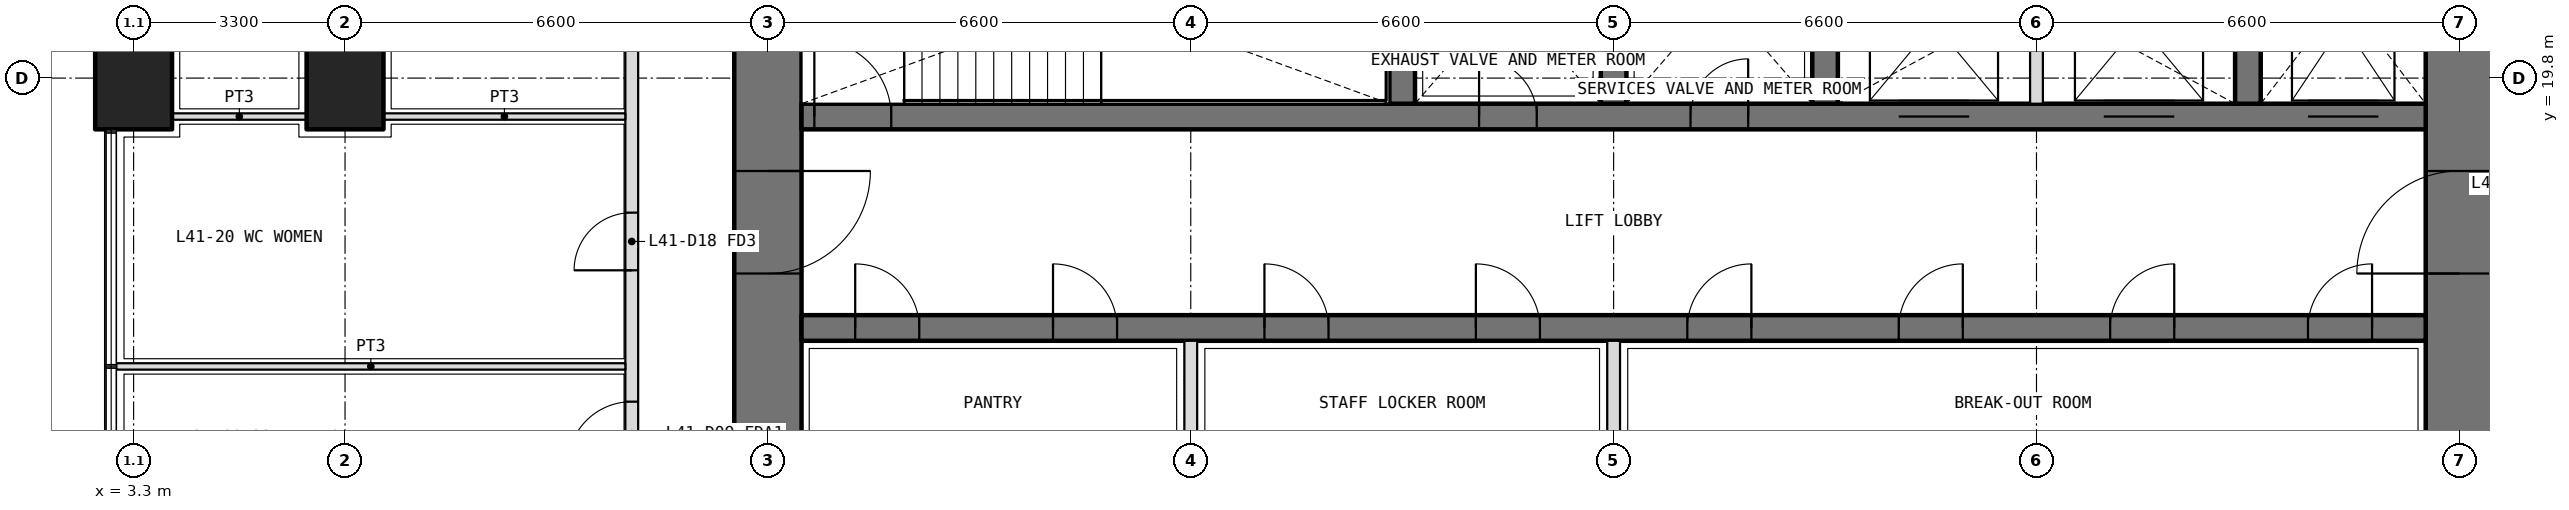
"""IFC4 building model, lengths in metres.
Left out: names, types, materials, properties, quantities, classifications, styles, units other than length and angle.
Written with IfcOpenShell. Run it as: python <this file> out.ifc"""

import sys

from ifc_helpers import new_model, si_unit, direction, frame, frame_2d, origin, origin_2d, place, context, subcontext, project, spatial, rectangle, extrude, element, fill, save


model = new_model("IFC4")
c1 = context("Model", 3, precision=1e-05, world=origin(), true_north=direction((0.0, 1.0)))
c2 = subcontext(c1, "Body", "Model", "MODEL_VIEW")
j1 = project(units=[si_unit("LENGTHUNIT", "METRE"), si_unit("PLANEANGLEUNIT", "RADIAN")], contexts=[c1])
p1 = place(None, origin())
s1 = spatial("IfcSite", under=j1, at=p1, CompositionType="ELEMENT")
p2 = place(p1, origin())
s2 = spatial("IfcBuilding", under=s1, at=p2, CompositionType="ELEMENT")
p3 = place(p2, frame((0.0, 0.0, 180.9)))
s3 = spatial("IfcBuildingStorey", under=s2, at=p3, CompositionType="ELEMENT", Elevation=180.9)
for number, where, z_axis, x_axis in (
    (1, (3.3, 19.8, 0.0), (0.0, 0.0, 1.0), (0.0, 1.0, 0.0)),
    (2, (6.6, 19.8, 0.0), (0.0, 0.0, 1.0), (0.0, 1.0, 0.0)),
):
    element("IfcColumn", number, at=place(p3, frame(where, z_axis=z_axis, x_axis=x_axis)), inside=s3, PredefinedType="COLUMN", context=c2, shape_type="SweptSolid", body=[
        extrude(rectangle(XDim=1.6, YDim=1.2, at=origin_2d()), origin(), (0.0, 0.0, 1.0), 4.2),
    ])
p4 = place(p3, frame((39.6, 13.725, 0.0), z_axis=(0.0, 0.0, 1.0), x_axis=(0.0, 1.0, 0.0)))
e3 = element("IfcWall", 3, at=p4, inside=s3, PredefinedType="SHEAR", context=c2, shape_type="SweptSolid", body=[
    extrude(rectangle(XDim=18.75, YDim=1.05, at=frame_2d((9.375, 0.0))), origin(), (0.0, 0.0, 1.0), 4.2),
])
p5 = place(p4, frame((3.025, 0.0, 0.0)))
e4 = element("IfcOpeningElement", 4, at=p5, cuts=e3, PredefinedType="OPENING", context=c2, shape_type="SweptSolid", body=[
    extrude(rectangle(XDim=1.6, YDim=2.1, at=frame_2d((0.8, 1.05))), frame((0.0, 0.535, 0.0), z_axis=(0.0, -1.0, 0.0), x_axis=(1.0, 0.0, 0.0)), (0.0, 0.0, 1.0), 1.07),
])
p6 = place(p4, frame((13.825, 0.0, 0.0)))
e5 = element("IfcOpeningElement", 5, at=p6, cuts=e3, PredefinedType="OPENING", context=c2, shape_type="SweptSolid", body=[
    extrude(rectangle(XDim=1.6, YDim=2.1, at=frame_2d((0.8, 1.05))), frame((0.0, 0.535, 0.0), z_axis=(0.0, -1.0, 0.0), x_axis=(1.0, 0.0, 0.0)), (0.0, 0.0, 1.0), 1.07),
])
p7 = place(p3, frame((13.2, 32.475, 0.0), z_axis=(0.0, 0.0, 1.0), x_axis=(0.0, -1.0, 0.0)))
e6 = element("IfcWall", 6, at=p7, inside=s3, PredefinedType="SHEAR", context=c2, shape_type="SweptSolid", body=[
    extrude(rectangle(XDim=18.75, YDim=1.05, at=frame_2d((9.375, 0.0))), origin(), (0.0, 0.0, 1.0), 4.2),
])
p8 = place(p7, frame((14.125, 0.0, 0.0)))
e7 = element("IfcOpeningElement", 7, at=p8, cuts=e6, PredefinedType="OPENING", context=c2, shape_type="SweptSolid", body=[
    extrude(rectangle(XDim=1.6, YDim=2.1, at=frame_2d((0.8, 1.05))), frame((0.0, 0.535, 0.0), z_axis=(0.0, -1.0, 0.0), x_axis=(1.0, 0.0, 0.0)), (0.0, 0.0, 1.0), 1.07),
])
p9 = place(p7, frame((3.325, 0.0, 0.0)))
e8 = element("IfcOpeningElement", 8, at=p9, cuts=e6, PredefinedType="OPENING", context=c2, shape_type="SweptSolid", body=[
    extrude(rectangle(XDim=1.6, YDim=2.1, at=frame_2d((0.8, 1.05))), frame((0.0, 0.535, 0.0), z_axis=(0.0, -1.0, 0.0), x_axis=(1.0, 0.0, 0.0)), (0.0, 0.0, 1.0), 1.07),
])
p10 = place(p3, frame((13.725, 15.9, 0.0), z_axis=(0.0, 0.0, 1.0), x_axis=(1.0, 0.0, 0.0)))
e9 = element("IfcWall", 9, at=p10, inside=s3, PredefinedType="SHEAR", context=c2, shape_type="SweptSolid", body=[
    extrude(rectangle(XDim=25.35, YDim=0.4, at=frame_2d((12.675, 0.0))), origin(), (0.0, 0.0, 1.0), 4.2),
])
p11 = place(p10, frame((0.837, 0.0, 0.0)))
e10 = element("IfcOpeningElement", 10, at=p11, cuts=e9, PredefinedType="OPENING", context=c2, shape_type="SweptSolid", body=[
    extrude(rectangle(XDim=1.0, YDim=2.1, at=frame_2d((0.5, 1.05))), frame((0.0, 0.21, 0.0), z_axis=(0.0, -1.0, 0.0), x_axis=(1.0, 0.0, 0.0)), (0.0, 0.0, 1.0), 0.42),
])
p12 = place(p10, frame((3.925, 0.0, 0.0)))
e11 = element("IfcOpeningElement", 11, at=p12, cuts=e9, PredefinedType="OPENING", context=c2, shape_type="SweptSolid", body=[
    extrude(rectangle(XDim=1.0, YDim=2.1, at=frame_2d((0.5, 1.05))), frame((0.0, 0.21, 0.0), z_axis=(0.0, -1.0, 0.0), x_axis=(1.0, 0.0, 0.0)), (0.0, 0.0, 1.0), 0.42),
])
p13 = place(p10, frame((7.225, 0.0, 0.0)))
e12 = element("IfcOpeningElement", 12, at=p13, cuts=e9, PredefinedType="OPENING", context=c2, shape_type="SweptSolid", body=[
    extrude(rectangle(XDim=1.0, YDim=2.1, at=frame_2d((0.5, 1.05))), frame((0.0, 0.21, 0.0), z_axis=(0.0, -1.0, 0.0), x_axis=(1.0, 0.0, 0.0)), (0.0, 0.0, 1.0), 0.42),
])
p14 = place(p10, frame((10.525, 0.0, 0.0)))
e13 = element("IfcOpeningElement", 13, at=p14, cuts=e9, PredefinedType="OPENING", context=c2, shape_type="SweptSolid", body=[
    extrude(rectangle(XDim=1.0, YDim=2.1, at=frame_2d((0.5, 1.05))), frame((0.0, 0.21, 0.0), z_axis=(0.0, -1.0, 0.0), x_axis=(1.0, 0.0, 0.0)), (0.0, 0.0, 1.0), 0.42),
])
p15 = place(p10, frame((13.825, 0.0, 0.0)))
e14 = element("IfcOpeningElement", 14, at=p15, cuts=e9, PredefinedType="OPENING", context=c2, shape_type="SweptSolid", body=[
    extrude(rectangle(XDim=1.0, YDim=2.1, at=frame_2d((0.5, 1.05))), frame((0.0, 0.21, 0.0), z_axis=(0.0, -1.0, 0.0), x_axis=(1.0, 0.0, 0.0)), (0.0, 0.0, 1.0), 0.42),
])
p16 = place(p10, frame((17.125, 0.0, 0.0)))
e15 = element("IfcOpeningElement", 15, at=p16, cuts=e9, PredefinedType="OPENING", context=c2, shape_type="SweptSolid", body=[
    extrude(rectangle(XDim=1.0, YDim=2.1, at=frame_2d((0.5, 1.05))), frame((0.0, 0.21, 0.0), z_axis=(0.0, -1.0, 0.0), x_axis=(1.0, 0.0, 0.0)), (0.0, 0.0, 1.0), 0.42),
])
p17 = place(p10, frame((20.425, 0.0, 0.0)))
e16 = element("IfcOpeningElement", 16, at=p17, cuts=e9, PredefinedType="OPENING", context=c2, shape_type="SweptSolid", body=[
    extrude(rectangle(XDim=1.0, YDim=2.1, at=frame_2d((0.5, 1.05))), frame((0.0, 0.21, 0.0), z_axis=(0.0, -1.0, 0.0), x_axis=(1.0, 0.0, 0.0)), (0.0, 0.0, 1.0), 0.42),
])
p18 = place(p10, frame((23.512, 0.0, 0.0)))
e17 = element("IfcOpeningElement", 17, at=p18, cuts=e9, PredefinedType="OPENING", context=c2, shape_type="SweptSolid", body=[
    extrude(rectangle(XDim=1.0, YDim=2.1, at=frame_2d((0.5, 1.05))), frame((0.0, 0.21, 0.0), z_axis=(0.0, -1.0, 0.0), x_axis=(1.0, 0.0, 0.0)), (0.0, 0.0, 1.0), 0.42),
])
p19 = place(p3, frame((13.725, 19.2, 0.0), z_axis=(0.0, 0.0, 1.0), x_axis=(1.0, 0.0, 0.0)))
e18 = element("IfcWall", 18, at=p19, inside=s3, PredefinedType="SHEAR", context=c2, shape_type="SweptSolid", body=[
    extrude(rectangle(XDim=25.35, YDim=0.4, at=frame_2d((12.675, 0.0))), origin(), (0.0, 0.0, 1.0), 4.2),
])
p20 = place(p19, frame((10.575, 0.0, 0.0)))
e19 = element("IfcOpeningElement", 19, at=p20, cuts=e18, PredefinedType="OPENING", context=c2, shape_type="SweptSolid", body=[
    extrude(rectangle(XDim=0.9, YDim=2.1, at=frame_2d((0.45, 1.05))), frame((0.0, 0.21, 0.0), z_axis=(0.0, -1.0, 0.0), x_axis=(1.0, 0.0, 0.0)), (0.0, 0.0, 1.0), 0.42),
])
p21 = place(p19, frame((13.875, 0.0, 0.0)))
e20 = element("IfcOpeningElement", 20, at=p21, cuts=e18, PredefinedType="OPENING", context=c2, shape_type="SweptSolid", body=[
    extrude(rectangle(XDim=0.9, YDim=2.1, at=frame_2d((0.45, 1.05))), frame((0.0, 0.21, 0.0), z_axis=(0.0, -1.0, 0.0), x_axis=(1.0, 0.0, 0.0)), (0.0, 0.0, 1.0), 0.42),
])
p22 = place(p19, frame((0.2, 0.0, 0.0)))
e21 = element("IfcOpeningElement", 21, at=p22, cuts=e18, PredefinedType="OPENING", context=c2, shape_type="SweptSolid", body=[
    extrude(rectangle(XDim=1.2, YDim=2.1, at=frame_2d((0.6, 1.05))), frame((0.0, 0.21, 0.0), z_axis=(0.0, -1.0, 0.0), x_axis=(1.0, 0.0, 0.0)), (0.0, 0.0, 1.0), 0.42),
])
p23 = place(p19, frame((23.512, 0.0, 0.0)))
e22 = element("IfcOpeningElement", 22, at=p23, cuts=e18, PredefinedType="OPENING", context=c2, shape_type="SweptSolid", body=[
    extrude(rectangle(XDim=1.1, YDim=2.1, at=frame_2d((0.55, 1.05))), frame((0.0, 0.21, 0.0), z_axis=(0.0, -1.0, 0.0), x_axis=(1.0, 0.0, 0.0)), (0.0, 0.0, 1.0), 0.42),
])
p24 = place(p19, frame((17.125, 0.0, 0.0)))
e23 = element("IfcOpeningElement", 23, at=p24, cuts=e18, PredefinedType="OPENING", context=c2, shape_type="SweptSolid", body=[
    extrude(rectangle(XDim=1.1, YDim=2.1, at=frame_2d((0.55, 1.05))), frame((0.0, 0.21, 0.0), z_axis=(0.0, -1.0, 0.0), x_axis=(1.0, 0.0, 0.0)), (0.0, 0.0, 1.0), 0.42),
])
p25 = place(p19, frame((20.325, 0.0, 0.0)))
e24 = element("IfcOpeningElement", 24, at=p25, cuts=e18, PredefinedType="OPENING", context=c2, shape_type="SweptSolid", body=[
    extrude(rectangle(XDim=1.1, YDim=2.1, at=frame_2d((0.55, 1.05))), frame((0.0, 0.21, 0.0), z_axis=(0.0, -1.0, 0.0), x_axis=(1.0, 0.0, 0.0)), (0.0, 0.0, 1.0), 0.42),
])
for number, where, z_axis, x_axis in (
    (25, (23.1, 19.4, 0.0), (0.0, 0.0, 1.0), (0.0, 1.0, 0.0)),
    (26, (26.4, 19.4, 0.0), (0.0, 0.0, 1.0), (0.0, 1.0, 0.0)),
    (27, (29.7, 19.4, 0.0), (0.0, 0.0, 1.0), (0.0, 1.0, 0.0)),
    (28, (36.3, 19.4, 0.0), (0.0, 0.0, 1.0), (0.0, 1.0, 0.0)),
):
    element("IfcWall", number, at=place(p3, frame(where, z_axis=z_axis, x_axis=x_axis)), inside=s3, PredefinedType="SHEAR", context=c2, shape_type="SweptSolid", body=[
        extrude(rectangle(XDim=3.35, YDim=0.4, at=frame_2d((1.675, 0.0))), origin(), (0.0, 0.0, 1.0), 4.2),
    ])
for number, where, z_axis, x_axis in (
    (29, (19.8, 13.725, 0.0), (0.0, 0.0, 1.0), (0.0, 1.0, 0.0)),
    (30, (26.4, 13.725, 0.0), (0.0, 0.0, 1.0), (0.0, 1.0, 0.0)),
):
    element("IfcWall", number, at=place(p3, frame(where, z_axis=z_axis, x_axis=x_axis)), inside=s3, PredefinedType="PARTITIONING", context=c2, shape_type="SweptSolid", body=[
        extrude(rectangle(XDim=1.975, YDim=0.2, at=frame_2d((0.987, 0.0))), origin(), (0.0, 0.0, 1.0), 4.2),
    ])
p26 = place(p3, frame((33.0, 19.4, 0.0), z_axis=(0.0, 0.0, 1.0), x_axis=(0.0, 1.0, 0.0)))
e31 = element("IfcWall", 31, at=p26, inside=s3, PredefinedType="PARTITIONING", context=c2, shape_type="SweptSolid", body=[
    extrude(rectangle(XDim=3.35, YDim=0.2, at=frame_2d((1.675, 0.0))), origin(), (0.0, 0.0, 1.0), 4.2),
])
p27 = place(p3, frame((11.075, 11.175, 0.0), z_axis=(0.0, 0.0, 1.0), x_axis=(0.0, 1.0, 0.0)))
e32 = element("IfcWall", 32, at=p27, inside=s3, PredefinedType="PARTITIONING", context=c2, shape_type="SweptSolid", body=[
    extrude(rectangle(XDim=23.85, YDim=0.2, at=frame_2d((11.925, 0.0))), origin(), (0.0, 0.0, 1.0), 2.85),
])
p28 = place(p27, frame((0.462, 0.0, 0.0)))
e33 = element("IfcOpeningElement", 33, at=p28, cuts=e32, PredefinedType="OPENING", context=c2, shape_type="SweptSolid", body=[
    extrude(rectangle(XDim=1.0, YDim=2.1, at=frame_2d((0.5, 1.05))), frame((0.0, 0.11, 0.0), z_axis=(0.0, -1.0, 0.0), x_axis=(1.0, 0.0, 0.0)), (0.0, 0.0, 1.0), 0.22),
])
p29 = place(p27, frame((2.575, 0.0, 0.0)))
e34 = element("IfcOpeningElement", 34, at=p29, cuts=e32, PredefinedType="OPENING", context=c2, shape_type="SweptSolid", body=[
    extrude(rectangle(XDim=1.0, YDim=2.1, at=frame_2d((0.5, 1.05))), frame((0.0, 0.11, 0.0), z_axis=(0.0, -1.0, 0.0), x_axis=(1.0, 0.0, 0.0)), (0.0, 0.0, 1.0), 0.22),
])
p30 = place(p27, frame((5.625, 0.0, 0.0)))
e35 = element("IfcOpeningElement", 35, at=p30, cuts=e32, PredefinedType="OPENING", context=c2, shape_type="SweptSolid", body=[
    extrude(rectangle(XDim=0.9, YDim=2.1, at=frame_2d((0.45, 1.05))), frame((0.0, 0.11, 0.0), z_axis=(0.0, -1.0, 0.0), x_axis=(1.0, 0.0, 0.0)), (0.0, 0.0, 1.0), 0.22),
])
p31 = place(p27, frame((9.425, 0.0, 0.0)))
e36 = element("IfcOpeningElement", 36, at=p31, cuts=e32, PredefinedType="OPENING", context=c2, shape_type="SweptSolid", body=[
    extrude(rectangle(XDim=0.9, YDim=2.1, at=frame_2d((0.45, 1.05))), frame((0.0, 0.11, 0.0), z_axis=(0.0, -1.0, 0.0), x_axis=(1.0, 0.0, 0.0)), (0.0, 0.0, 1.0), 0.22),
])
p32 = place(p27, frame((12.975, 0.0, 0.0)))
e37 = element("IfcOpeningElement", 37, at=p32, cuts=e32, PredefinedType="OPENING", context=c2, shape_type="SweptSolid", body=[
    extrude(rectangle(XDim=1.0, YDim=2.1, at=frame_2d((0.5, 1.05))), frame((0.0, 0.11, 0.0), z_axis=(0.0, -1.0, 0.0), x_axis=(1.0, 0.0, 0.0)), (0.0, 0.0, 1.0), 0.22),
])
p33 = place(p27, frame((19.087, 0.0, 0.0)))
e38 = element("IfcOpeningElement", 38, at=p33, cuts=e32, PredefinedType="OPENING", context=c2, shape_type="SweptSolid", body=[
    extrude(rectangle(XDim=1.0, YDim=2.1, at=frame_2d((0.5, 1.05))), frame((0.0, 0.11, 0.0), z_axis=(0.0, -1.0, 0.0), x_axis=(1.0, 0.0, 0.0)), (0.0, 0.0, 1.0), 0.22),
])
p34 = place(p3, frame((3.03, 15.3, 0.0), z_axis=(0.0, 0.0, 1.0), x_axis=(1.0, 0.0, 0.0)))
e39 = element("IfcWall", 39, at=p34, inside=s3, PredefinedType="PARTITIONING", context=c2, shape_type="SweptSolid", body=[
    extrude(rectangle(XDim=7.945, YDim=0.1, at=frame_2d((3.973, 0.0))), origin(), (0.0, 0.0, 1.0), 2.7),
])
p35 = place(p3, frame((3.9, 19.2, 0.0), z_axis=(0.0, 0.0, 1.0), x_axis=(1.0, 0.0, 0.0)))
e40 = element("IfcWall", 40, at=p35, inside=s3, PredefinedType="PARTITIONING", context=c2, shape_type="SweptSolid", body=[
    extrude(rectangle(XDim=2.1, YDim=0.1, at=frame_2d((1.05, 0.0))), origin(), (0.0, 0.0, 1.0), 2.85),
])
p36 = place(p3, frame((7.2, 19.2, 0.0), z_axis=(0.0, 0.0, 1.0), x_axis=(1.0, 0.0, 0.0)))
e41 = element("IfcWall", 41, at=p36, inside=s3, PredefinedType="PARTITIONING", context=c2, shape_type="SweptSolid", body=[
    extrude(rectangle(XDim=3.775, YDim=0.1, at=frame_2d((1.888, 0.0))), origin(), (0.0, 0.0, 1.0), 2.85),
])
p37 = place(p29, origin())
e42 = element("IfcDoor", 42, at=p37, inside=s3, OperationType="SINGLE_SWING_LEFT", PredefinedType="DOOR", context=c2, shape_type="SweptSolid", body=[
    extrude(rectangle(XDim=1.0, YDim=2.1, at=frame_2d((0.5, 1.05))), frame((0.0, 0.025, 0.0), z_axis=(0.0, -1.0, 0.0), x_axis=(1.0, 0.0, 0.0)), (0.0, 0.0, 1.0), 0.05),
])
fill(e34, e42)
p38 = place(p30, origin())
e43 = element("IfcDoor", 43, at=p38, inside=s3, OperationType="SINGLE_SWING_LEFT", PredefinedType="DOOR", context=c2, shape_type="SweptSolid", body=[
    extrude(rectangle(XDim=0.9, YDim=2.1, at=frame_2d((0.45, 1.05))), frame((0.0, 0.025, 0.0), z_axis=(0.0, -1.0, 0.0), x_axis=(1.0, 0.0, 0.0)), (0.0, 0.0, 1.0), 0.05),
])
fill(e35, e43)
p39 = place(p20, origin())
e44 = element("IfcDoor", 44, at=p39, inside=s3, OperationType="SINGLE_SWING_LEFT", PredefinedType="DOOR", context=c2, shape_type="SweptSolid", body=[
    extrude(rectangle(XDim=0.9, YDim=2.1, at=frame_2d((0.45, 1.05))), frame((0.0, 0.025, 0.0), z_axis=(0.0, -1.0, 0.0), x_axis=(1.0, 0.0, 0.0)), (0.0, 0.0, 1.0), 0.05),
])
fill(e19, e44)
p40 = place(p21, origin())
e45 = element("IfcDoor", 45, at=p40, inside=s3, OperationType="SINGLE_SWING_RIGHT", PredefinedType="DOOR", context=c2, shape_type="SweptSolid", body=[
    extrude(rectangle(XDim=0.9, YDim=2.1, at=frame_2d((0.45, 1.05))), frame((0.0, 0.025, 0.0), z_axis=(0.0, -1.0, 0.0), x_axis=(1.0, 0.0, 0.0)), (0.0, 0.0, 1.0), 0.05),
])
fill(e20, e45)
p41 = place(p11, origin())
e46 = element("IfcDoor", 46, at=p41, inside=s3, OperationType="SINGLE_SWING_LEFT", PredefinedType="DOOR", context=c2, shape_type="SweptSolid", body=[
    extrude(rectangle(XDim=1.0, YDim=2.1, at=frame_2d((0.5, 1.05))), frame((0.0, 0.025, 0.0), z_axis=(0.0, -1.0, 0.0), x_axis=(1.0, 0.0, 0.0)), (0.0, 0.0, 1.0), 0.05),
])
fill(e10, e46)
p42 = place(p12, origin())
e47 = element("IfcDoor", 47, at=p42, inside=s3, OperationType="SINGLE_SWING_LEFT", PredefinedType="DOOR", context=c2, shape_type="SweptSolid", body=[
    extrude(rectangle(XDim=1.0, YDim=2.1, at=frame_2d((0.5, 1.05))), frame((0.0, 0.025, 0.0), z_axis=(0.0, -1.0, 0.0), x_axis=(1.0, 0.0, 0.0)), (0.0, 0.0, 1.0), 0.05),
])
fill(e11, e47)
p43 = place(p13, origin())
e48 = element("IfcDoor", 48, at=p43, inside=s3, OperationType="SINGLE_SWING_LEFT", PredefinedType="DOOR", context=c2, shape_type="SweptSolid", body=[
    extrude(rectangle(XDim=1.0, YDim=2.1, at=frame_2d((0.5, 1.05))), frame((0.0, 0.025, 0.0), z_axis=(0.0, -1.0, 0.0), x_axis=(1.0, 0.0, 0.0)), (0.0, 0.0, 1.0), 0.05),
])
fill(e12, e48)
p44 = place(p14, origin())
e49 = element("IfcDoor", 49, at=p44, inside=s3, OperationType="SINGLE_SWING_LEFT", PredefinedType="DOOR", context=c2, shape_type="SweptSolid", body=[
    extrude(rectangle(XDim=1.0, YDim=2.1, at=frame_2d((0.5, 1.05))), frame((0.0, 0.025, 0.0), z_axis=(0.0, -1.0, 0.0), x_axis=(1.0, 0.0, 0.0)), (0.0, 0.0, 1.0), 0.05),
])
fill(e13, e49)
p45 = place(p15, origin())
e50 = element("IfcDoor", 50, at=p45, inside=s3, OperationType="SINGLE_SWING_RIGHT", PredefinedType="DOOR", context=c2, shape_type="SweptSolid", body=[
    extrude(rectangle(XDim=1.0, YDim=2.1, at=frame_2d((0.5, 1.05))), frame((0.0, 0.025, 0.0), z_axis=(0.0, -1.0, 0.0), x_axis=(1.0, 0.0, 0.0)), (0.0, 0.0, 1.0), 0.05),
])
fill(e14, e50)
p46 = place(p16, origin())
e51 = element("IfcDoor", 51, at=p46, inside=s3, OperationType="SINGLE_SWING_RIGHT", PredefinedType="DOOR", context=c2, shape_type="SweptSolid", body=[
    extrude(rectangle(XDim=1.0, YDim=2.1, at=frame_2d((0.5, 1.05))), frame((0.0, 0.025, 0.0), z_axis=(0.0, -1.0, 0.0), x_axis=(1.0, 0.0, 0.0)), (0.0, 0.0, 1.0), 0.05),
])
fill(e15, e51)
p47 = place(p17, origin())
e52 = element("IfcDoor", 52, at=p47, inside=s3, OperationType="SINGLE_SWING_RIGHT", PredefinedType="DOOR", context=c2, shape_type="SweptSolid", body=[
    extrude(rectangle(XDim=1.0, YDim=2.1, at=frame_2d((0.5, 1.05))), frame((0.0, 0.025, 0.0), z_axis=(0.0, -1.0, 0.0), x_axis=(1.0, 0.0, 0.0)), (0.0, 0.0, 1.0), 0.05),
])
fill(e16, e52)
p48 = place(p18, origin())
e53 = element("IfcDoor", 53, at=p48, inside=s3, OperationType="SINGLE_SWING_RIGHT", PredefinedType="DOOR", context=c2, shape_type="SweptSolid", body=[
    extrude(rectangle(XDim=1.0, YDim=2.1, at=frame_2d((0.5, 1.05))), frame((0.0, 0.025, 0.0), z_axis=(0.0, -1.0, 0.0), x_axis=(1.0, 0.0, 0.0)), (0.0, 0.0, 1.0), 0.05),
])
fill(e17, e53)
p49 = place(p22, origin())
e54 = element("IfcDoor", 54, at=p49, inside=s3, OperationType="SINGLE_SWING_LEFT", PredefinedType="DOOR", context=c2, shape_type="SweptSolid", body=[
    extrude(rectangle(XDim=1.2, YDim=2.1, at=frame_2d((0.6, 1.05))), frame((0.0, 0.025, 0.0), z_axis=(0.0, -1.0, 0.0), x_axis=(1.0, 0.0, 0.0)), (0.0, 0.0, 1.0), 0.05),
])
fill(e21, e54)
p50 = place(p8, origin())
e55 = element("IfcDoor", 55, at=p50, inside=s3, OperationType="DOUBLE_DOOR_DOUBLE_SWING", PredefinedType="DOOR", context=c2, shape_type="SweptSolid", body=[
    extrude(rectangle(XDim=1.6, YDim=2.1, at=frame_2d((0.8, 1.05))), frame((0.0, 0.025, 0.0), z_axis=(0.0, -1.0, 0.0), x_axis=(1.0, 0.0, 0.0)), (0.0, 0.0, 1.0), 0.05),
])
fill(e7, e55)
p51 = place(p5, origin())
e56 = element("IfcDoor", 56, at=p51, inside=s3, OperationType="DOUBLE_DOOR_DOUBLE_SWING", PredefinedType="DOOR", context=c2, shape_type="SweptSolid", body=[
    extrude(rectangle(XDim=1.6, YDim=2.1, at=frame_2d((0.8, 1.05))), frame((0.0, 0.025, 0.0), z_axis=(0.0, -1.0, 0.0), x_axis=(1.0, 0.0, 0.0)), (0.0, 0.0, 1.0), 0.05),
])
fill(e4, e56)
p52 = place(p23, origin())
e57 = element("IfcDoor", 57, at=p52, inside=s3, OperationType="DOUBLE_DOOR_SLIDING", PredefinedType="DOOR", context=c2, shape_type="SweptSolid", body=[
    extrude(rectangle(XDim=1.1, YDim=2.1, at=frame_2d((0.55, 1.05))), frame((0.0, 0.025, 0.0), z_axis=(0.0, -1.0, 0.0), x_axis=(1.0, 0.0, 0.0)), (0.0, 0.0, 1.0), 0.05),
])
fill(e22, e57)
p53 = place(p24, origin())
e58 = element("IfcDoor", 58, at=p53, inside=s3, OperationType="DOUBLE_DOOR_SLIDING", PredefinedType="DOOR", context=c2, shape_type="SweptSolid", body=[
    extrude(rectangle(XDim=1.1, YDim=2.1, at=frame_2d((0.55, 1.05))), frame((0.0, 0.025, 0.0), z_axis=(0.0, -1.0, 0.0), x_axis=(1.0, 0.0, 0.0)), (0.0, 0.0, 1.0), 0.05),
])
fill(e23, e58)
p54 = place(p25, origin())
e59 = element("IfcDoor", 59, at=p54, inside=s3, OperationType="DOUBLE_DOOR_SLIDING", PredefinedType="DOOR", context=c2, shape_type="SweptSolid", body=[
    extrude(rectangle(XDim=1.1, YDim=2.1, at=frame_2d((0.55, 1.05))), frame((0.0, 0.025, 0.0), z_axis=(0.0, -1.0, 0.0), x_axis=(1.0, 0.0, 0.0)), (0.0, 0.0, 1.0), 0.05),
])
fill(e24, e59)
save(model, sys.argv[1])
